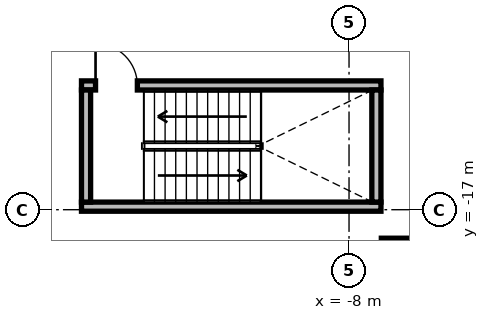
"""IFC4 building model, lengths in metres.
Left out: names, types, materials, properties, quantities, classifications, styles, units other than length and angle.
Written with IfcOpenShell. Run it as: python <this file> out.ifc"""

import sys

from ifc_helpers import new_model, si_unit, direction, frame, frame_2d, origin, origin_2d, place, context, subcontext, project, spatial, rectangle, extrude, source, transform, mapped, element, fill, save


model = new_model("IFC4")
c1 = context("Model", 3, precision=1e-05, world=origin(), true_north=direction((0.0, 1.0)))
c2 = subcontext(c1, "Body", "Model", "MODEL_VIEW")
j1 = project(units=[si_unit("LENGTHUNIT", "METRE"), si_unit("PLANEANGLEUNIT", "RADIAN")], contexts=[c1])
p1 = place(None, origin())
s1 = spatial("IfcSite", under=j1, at=p1, CompositionType="ELEMENT")
p2 = place(p1, origin())
s2 = spatial("IfcBuilding", under=s1, at=p2, CompositionType="ELEMENT")
p3 = place(p2, frame((0.0, 0.0, -4.2)))
s3 = spatial("IfcBuildingStorey", under=s2, at=p3, CompositionType="ELEMENT", Elevation=-4.2)
m1 = source(origin(), c2, "Body", "SweptSolid", [
    extrude(rectangle(XDim=1.3, YDim=1.3, at=origin_2d()), origin(), (0.0, 0.0, 1.0), 4.2),
])
p4 = place(p3, frame((-6.5, -18.4, 0.0), z_axis=(0.0, 0.0, 1.0), x_axis=(1.0, 0.0, 0.0)))
e1 = element("IfcColumn", 1, at=p4, inside=s3, PredefinedType="COLUMN", context=c2, shape_type="MappedRepresentation", body=[
    mapped(m1, transform((0.0, 0.0, 0.0), x_axis=(1.0, 0.0, 0.0), y_axis=(0.0, 1.0, 0.0), z_axis=(0.0, 0.0, 1.0), scale=1.0)),
])
m2 = source(origin(), c2, "Body", "SweptSolid", [
    extrude(rectangle(XDim=7.88, YDim=0.24, at=frame_2d((3.94, 0.0))), origin(), (0.0, 0.0, 1.0), 3.88),
])
p5 = place(p3, frame((-15.04, -13.73, 0.0), z_axis=(0.0, 0.0, 1.0), x_axis=(1.0, 0.0, 0.0)))
e2 = element("IfcWall", 2, at=p5, inside=s3, PredefinedType="PARTITIONING", context=c2, shape_type="MappedRepresentation", body=[
    mapped(m2, transform((0.0, 0.0, 0.0), x_axis=(1.0, 0.0, 0.0), y_axis=(0.0, 1.0, 0.0), z_axis=(0.0, 0.0, 1.0), scale=1.0)),
])
p6 = place(p5, frame((0.37, 0.0, 0.0)))
e3 = element("IfcOpeningElement", 3, at=p6, cuts=e2, PredefinedType="OPENING", context=c2, shape_type="SweptSolid", body=[
    extrude(rectangle(XDim=1.1, YDim=2.15, at=frame_2d((0.55, 1.075))), frame((0.0, 0.13, 0.0), z_axis=(0.0, -1.0, 0.0), x_axis=(1.0, 0.0, 0.0)), (0.0, 0.0, 1.0), 0.26),
])
p7 = place(p3, frame((-15.04, -16.92, 0.0), z_axis=(0.0, 0.0, 1.0), x_axis=(1.0, 0.0, 0.0)))
e4 = element("IfcWall", 4, at=p7, inside=s3, PredefinedType="PARTITIONING", context=c2, shape_type="MappedRepresentation", body=[
    mapped(m2, transform((0.0, 0.0, 0.0), x_axis=(1.0, 0.0, 0.0), y_axis=(0.0, 1.0, 0.0), z_axis=(0.0, 0.0, 1.0), scale=1.0)),
])
m3 = source(origin(), c2, "Body", "SweptSolid", [
    extrude(rectangle(XDim=2.95, YDim=0.24, at=frame_2d((1.475, 0.0))), origin(), (0.0, 0.0, 1.0), 3.88),
])
for number, where, z_axis, x_axis in (
    (5, (-14.92, -16.8, 0.0), (0.0, 0.0, 1.0), (0.0, 1.0, 0.0)),
    (6, (-7.28, -16.8, 0.0), (0.0, 0.0, 1.0), (0.0, 1.0, 0.0)),
):
    element("IfcWall", number, at=place(p3, frame(where, z_axis=z_axis, x_axis=x_axis)), inside=s3, PredefinedType="PARTITIONING", context=c2, shape_type="MappedRepresentation", body=[
        mapped(m3, transform((0.0, 0.0, 0.0), x_axis=(1.0, 0.0, 0.0), y_axis=(0.0, 1.0, 0.0), z_axis=(0.0, 0.0, 1.0), scale=1.0)),
    ])
m4 = source(origin(), c2, "Body", "SweptSolid", [
    extrude(rectangle(XDim=1.1, YDim=2.15, at=frame_2d((0.55, 1.075))), frame((0.0, 0.025, 0.0), z_axis=(0.0, -1.0, 0.0), x_axis=(1.0, 0.0, 0.0)), (0.0, 0.0, 1.0), 0.05),
])
p8 = place(p6, origin())
e7 = element("IfcDoor", 7, at=p8, inside=s3, OperationType="SINGLE_SWING_LEFT", PredefinedType="DOOR", context=c2, shape_type="MappedRepresentation", body=[
    mapped(m4, transform((0.0, 0.0, 0.0), x_axis=(1.0, 0.0, 0.0), y_axis=(0.0, 1.0, 0.0), z_axis=(0.0, 0.0, 1.0), scale=1.0)),
])
fill(e3, e7)
save(model, sys.argv[1])
